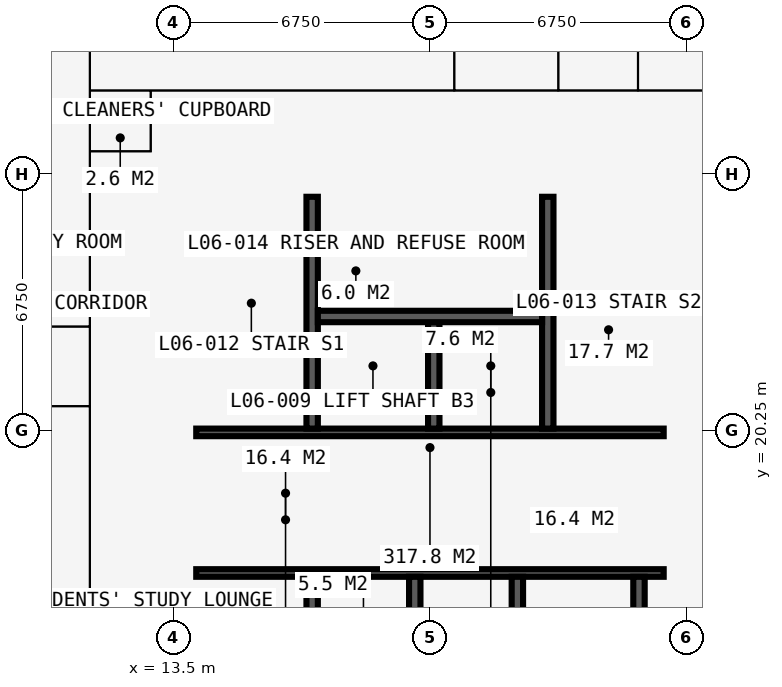
"""IFC4 building model, lengths in metres.
Left out: names, types, materials, properties, quantities, classifications, styles, units other than length and angle.
Written with IfcOpenShell. Run it as: python <this file> out.ifc"""

import sys

from ifc_helpers import new_model, si_unit, direction, frame, frame_2d, origin, place, context, subcontext, project, spatial, rectangle, extrude, element, fill, save


model = new_model("IFC4")
c1 = context("Model", 3, precision=1e-05, world=origin(), true_north=direction((0.0, 1.0)))
c2 = subcontext(c1, "Body", "Model", "MODEL_VIEW")
j1 = project(units=[si_unit("LENGTHUNIT", "METRE"), si_unit("PLANEANGLEUNIT", "RADIAN")], contexts=[c1])
p1 = place(None, origin())
s1 = spatial("IfcSite", under=j1, at=p1, CompositionType="ELEMENT")
p2 = place(p1, origin())
s2 = spatial("IfcBuilding", under=s1, at=p2, CompositionType="ELEMENT")
p3 = place(p2, frame((0.0, 0.0, 25.2)))
s3 = spatial("IfcBuildingStorey", under=s2, at=p3, CompositionType="ELEMENT", Elevation=25.2)
p4 = place(p3, frame((27.0, 14.1, 0.0), z_axis=(0.0, 0.0, 1.0), x_axis=(0.0, 1.0, 0.0)))
e1 = element("IfcWall", 1, at=p4, inside=s3, PredefinedType="SHEAR", context=c2, shape_type="SweptSolid", body=[
    extrude(rectangle(XDim=12.3, YDim=1.2, at=frame_2d((6.15, 0.0))), origin(), (0.0, 0.0, 1.0), 3.6),
])
p5 = place(p4, frame((3.65, 0.0, 0.0)))
e2 = element("IfcOpeningElement", 2, at=p5, cuts=e1, PredefinedType="OPENING", context=c2, shape_type="SweptSolid", body=[
    extrude(rectangle(XDim=1.2, YDim=2.2, at=frame_2d((0.6, 1.1))), frame((0.0, 0.61, 0.0), z_axis=(0.0, -1.0, 0.0), x_axis=(1.0, 0.0, 0.0)), (0.0, 0.0, 1.0), 1.22),
])
p6 = place(p3, frame((27.6, 27.0, 0.0), z_axis=(0.0, 0.0, 1.0), x_axis=(-1.0, 0.0, 0.0)))
e3 = element("IfcWall", 3, at=p6, inside=s3, PredefinedType="SHEAR", context=c2, shape_type="SweptSolid", body=[
    extrude(rectangle(XDim=14.7, YDim=1.2, at=frame_2d((7.35, 0.0))), origin(), (0.0, 0.0, 1.0), 3.6),
])
p7 = place(p6, frame((5.225, 0.0, 0.0)))
e4 = element("IfcOpeningElement", 4, at=p7, cuts=e3, PredefinedType="OPENING", context=c2, shape_type="SweptSolid", body=[
    extrude(rectangle(XDim=0.9, YDim=2.2, at=frame_2d((0.45, 1.1))), frame((0.0, 0.61, 0.0), z_axis=(0.0, -1.0, 0.0), x_axis=(1.0, 0.0, 0.0)), (0.0, 0.0, 1.0), 1.22),
])
p8 = place(p6, frame((8.2, 0.0, 0.0)))
e5 = element("IfcOpeningElement", 5, at=p8, cuts=e3, PredefinedType="OPENING", context=c2, shape_type="SweptSolid", body=[
    extrude(rectangle(XDim=1.0, YDim=2.2, at=frame_2d((0.5, 1.1))), frame((0.0, 0.61, 0.0), z_axis=(0.0, -1.0, 0.0), x_axis=(1.0, 0.0, 0.0)), (0.0, 0.0, 1.0), 1.22),
])
p9 = place(p3, frame((13.5, 26.4, 0.0), z_axis=(0.0, 0.0, 1.0), x_axis=(0.0, -1.0, 0.0)))
e6 = element("IfcWall", 6, at=p9, inside=s3, PredefinedType="SHEAR", context=c2, shape_type="SweptSolid", body=[
    extrude(rectangle(XDim=12.3, YDim=1.2, at=frame_2d((6.15, 0.0))), origin(), (0.0, 0.0, 1.0), 3.6),
])
p10 = place(p9, frame((7.45, 0.0, 0.0)))
e7 = element("IfcOpeningElement", 7, at=p10, cuts=e6, PredefinedType="OPENING", context=c2, shape_type="SweptSolid", body=[
    extrude(rectangle(XDim=1.2, YDim=2.2, at=frame_2d((0.6, 1.1))), frame((0.0, 0.61, 0.0), z_axis=(0.0, -1.0, 0.0), x_axis=(1.0, 0.0, 0.0)), (0.0, 0.0, 1.0), 1.22),
])
p11 = place(p3, frame((14.1, 16.5, 0.0), z_axis=(0.0, 0.0, 1.0), x_axis=(1.0, 0.0, 0.0)))
e8 = element("IfcWall", 8, at=p11, inside=s3, PredefinedType="SHEAR", context=c2, shape_type="SweptSolid", body=[
    extrude(rectangle(XDim=12.3, YDim=0.2, at=frame_2d((6.15, 0.0))), origin(), (0.0, 0.0, 1.0), 3.6),
])
p12 = place(p11, frame((0.9, 0.0, 0.0)))
e9 = element("IfcOpeningElement", 9, at=p12, cuts=e8, PredefinedType="OPENING", context=c2, shape_type="SweptSolid", body=[
    extrude(rectangle(XDim=1.1, YDim=2.2, at=frame_2d((0.55, 1.1))), frame((0.0, 0.11, 0.0), z_axis=(0.0, -1.0, 0.0), x_axis=(1.0, 0.0, 0.0)), (0.0, 0.0, 1.0), 0.22),
])
p13 = place(p11, frame((9.5, 0.0, 0.0)))
e10 = element("IfcOpeningElement", 10, at=p13, cuts=e8, PredefinedType="OPENING", context=c2, shape_type="SweptSolid", body=[
    extrude(rectangle(XDim=1.1, YDim=2.2, at=frame_2d((0.55, 1.1))), frame((0.0, 0.11, 0.0), z_axis=(0.0, -1.0, 0.0), x_axis=(1.0, 0.0, 0.0)), (0.0, 0.0, 1.0), 0.22),
])
p14 = place(p3, frame((14.1, 20.2, 0.0), z_axis=(0.0, 0.0, 1.0), x_axis=(1.0, 0.0, 0.0)))
e11 = element("IfcWall", 11, at=p14, inside=s3, PredefinedType="SHEAR", context=c2, shape_type="SweptSolid", body=[
    extrude(rectangle(XDim=12.3, YDim=0.2, at=frame_2d((6.15, 0.0))), origin(), (0.0, 0.0, 1.0), 3.6),
])
p15 = place(p14, frame((0.35, 0.0, 0.0)))
e12 = element("IfcOpeningElement", 12, at=p15, cuts=e11, PredefinedType="OPENING", context=c2, shape_type="SweptSolid", body=[
    extrude(rectangle(XDim=1.1, YDim=2.2, at=frame_2d((0.55, 1.1))), frame((0.0, 0.11, 0.0), z_axis=(0.0, -1.0, 0.0), x_axis=(1.0, 0.0, 0.0)), (0.0, 0.0, 1.0), 0.22),
])
p16 = place(p14, frame((9.75, 0.0, 0.0)))
e13 = element("IfcOpeningElement", 13, at=p16, cuts=e11, PredefinedType="OPENING", context=c2, shape_type="SweptSolid", body=[
    extrude(rectangle(XDim=1.1, YDim=2.2, at=frame_2d((0.55, 1.1))), frame((0.0, 0.11, 0.0), z_axis=(0.0, -1.0, 0.0), x_axis=(1.0, 0.0, 0.0)), (0.0, 0.0, 1.0), 0.22),
])
for number, where, z_axis, x_axis in (
    (14, (17.15, 20.3, 0.0), (0.0, 0.0, 1.0), (0.0, 1.0, 0.0)),
    (15, (23.35, 20.3, 0.0), (0.0, 0.0, 1.0), (0.0, 1.0, 0.0)),
):
    element("IfcWall", number, at=place(p3, frame(where, z_axis=z_axis, x_axis=x_axis)), inside=s3, PredefinedType="SHEAR", context=c2, shape_type="SweptSolid", body=[
        extrude(rectangle(XDim=6.1, YDim=0.3, at=frame_2d((3.05, 0.0))), origin(), (0.0, 0.0, 1.0), 3.6),
    ])
p17 = place(p3, frame((20.35, 20.3, 0.0), z_axis=(0.0, 0.0, 1.0), x_axis=(0.0, 1.0, 0.0)))
e16 = element("IfcWall", 16, at=p17, inside=s3, PredefinedType="SHEAR", context=c2, shape_type="SweptSolid", body=[
    extrude(rectangle(XDim=2.8, YDim=0.3, at=frame_2d((1.4, 0.0))), origin(), (0.0, 0.0, 1.0), 3.6),
])
p18 = place(p3, frame((17.3, 23.25, 0.0), z_axis=(0.0, 0.0, 1.0), x_axis=(1.0, 0.0, 0.0)))
e17 = element("IfcWall", 17, at=p18, inside=s3, PredefinedType="SHEAR", context=c2, shape_type="SweptSolid", body=[
    extrude(rectangle(XDim=5.9, YDim=0.3, at=frame_2d((2.95, 0.0))), origin(), (0.0, 0.0, 1.0), 3.6),
])
for number, where, z_axis, x_axis in (
    (18, (17.15, 14.1, 0.0), (0.0, 0.0, 1.0), (0.0, 1.0, 0.0)),
    (19, (19.85, 14.1, 0.0), (0.0, 0.0, 1.0), (0.0, 1.0, 0.0)),
    (20, (22.55, 14.1, 0.0), (0.0, 0.0, 1.0), (0.0, 1.0, 0.0)),
    (21, (25.75, 14.1, 0.0), (0.0, 0.0, 1.0), (0.0, 1.0, 0.0)),
):
    element("IfcWall", number, at=place(p3, frame(where, z_axis=z_axis, x_axis=x_axis)), inside=s3, PredefinedType="SHEAR", context=c2, shape_type="SweptSolid", body=[
        extrude(rectangle(XDim=2.3, YDim=0.3, at=frame_2d((1.15, 0.0))), origin(), (0.0, 0.0, 1.0), 3.6),
    ])
p19 = place(p3, frame((18.875, 16.6, 0.0), z_axis=(0.0, 0.0, 1.0), x_axis=(0.0, 1.0, 0.0)))
e22 = element("IfcWall", 22, at=p19, inside=s3, PredefinedType="PARTITIONING", context=c2, shape_type="SweptSolid", body=[
    extrude(rectangle(XDim=3.5, YDim=0.15, at=frame_2d((1.75, 0.0))), origin(), (0.0, 0.0, 1.0), 3.375),
])
p20 = place(p19, frame((1.15, 0.0, 0.0)))
e23 = element("IfcOpeningElement", 23, at=p20, cuts=e22, PredefinedType="OPENING", context=c2, shape_type="SweptSolid", body=[
    extrude(rectangle(XDim=1.2, YDim=2.2, at=frame_2d((0.6, 1.1))), frame((0.0, 0.085, 0.0), z_axis=(0.0, -1.0, 0.0), x_axis=(1.0, 0.0, 0.0)), (0.0, 0.0, 1.0), 0.17),
])
p21 = place(p3, frame((21.625, 16.6, 0.0), z_axis=(0.0, 0.0, 1.0), x_axis=(0.0, 1.0, 0.0)))
e24 = element("IfcWall", 24, at=p21, inside=s3, PredefinedType="PARTITIONING", context=c2, shape_type="SweptSolid", body=[
    extrude(rectangle(XDim=3.5, YDim=0.15, at=frame_2d((1.75, 0.0))), origin(), (0.0, 0.0, 1.0), 3.375),
])
p22 = place(p21, frame((1.15, 0.0, 0.0)))
e25 = element("IfcOpeningElement", 25, at=p22, cuts=e24, PredefinedType="OPENING", context=c2, shape_type="SweptSolid", body=[
    extrude(rectangle(XDim=1.2, YDim=2.2, at=frame_2d((0.6, 1.1))), frame((0.0, 0.085, 0.0), z_axis=(0.0, -1.0, 0.0), x_axis=(1.0, 0.0, 0.0)), (0.0, 0.0, 1.0), 0.17),
])
p23 = place(p3, frame((20.38, 16.6, 0.0), z_axis=(0.0, 0.0, 1.0), x_axis=(0.0, 1.0, 0.0)))
e26 = element("IfcWall", 26, at=p23, inside=s3, PredefinedType="PARTITIONING", context=c2, shape_type="SweptSolid", body=[
    extrude(rectangle(XDim=3.5, YDim=0.15, at=frame_2d((1.75, 0.0))), origin(), (0.0, 0.0, 1.0), 3.375),
])
p24 = place(p3, frame((19.375, 23.4, 0.0), z_axis=(0.0, 0.0, 1.0), x_axis=(0.0, 1.0, 0.0)))
e27 = element("IfcWall", 27, at=p24, inside=s3, PredefinedType="PARTITIONING", context=c2, shape_type="SweptSolid", body=[
    extrude(rectangle(XDim=3.0, YDim=0.15, at=frame_2d((1.5, 0.0))), origin(), (0.0, 0.0, 1.0), 3.375),
])
for number, where, z_axis, x_axis in (
    (28, (5.65, 20.887, 0.0), (0.0, 0.0, 1.0), (1.0, 0.0, 0.0)),
    (29, (5.65, 22.988, 0.0), (0.0, 0.0, 1.0), (1.0, 0.0, 0.0)),
):
    element("IfcWall", number, at=place(p3, frame(where, z_axis=z_axis, x_axis=x_axis)), inside=s3, PredefinedType="PARTITIONING", context=c2, shape_type="SweptSolid", body=[
        extrude(rectangle(XDim=5.65, YDim=0.15, at=frame_2d((2.825, 0.0))), origin(), (0.0, 0.0, 1.0), 3.375),
    ])
p25 = place(p3, frame((11.3, 11.3, 0.0), z_axis=(0.0, 0.0, 1.0), x_axis=(0.0, 1.0, 0.0)))
e30 = element("IfcWall", 30, at=p25, inside=s3, PredefinedType="PARTITIONING", context=c2, shape_type="SweptSolid", body=[
    extrude(rectangle(XDim=19.075, YDim=0.15, at=frame_2d((9.538, 0.0))), origin(), (0.0, 0.0, 1.0), 3.375),
])
p26 = place(p25, frame((10.137, 0.0, 0.0)))
e31 = element("IfcOpeningElement", 31, at=p26, cuts=e30, PredefinedType="OPENING", context=c2, shape_type="SweptSolid", body=[
    extrude(rectangle(XDim=1.0, YDim=2.2, at=frame_2d((0.5, 1.1))), frame((0.0, 0.085, 0.0), z_axis=(0.0, -1.0, 0.0), x_axis=(1.0, 0.0, 0.0)), (0.0, 0.0, 1.0), 0.17),
])
p27 = place(p3, frame((11.3, 27.6, 0.0), z_axis=(0.0, 0.0, 1.0), x_axis=(1.0, 0.0, 0.0)))
e32 = element("IfcWall", 32, at=p27, inside=s3, PredefinedType="PARTITIONING", context=c2, shape_type="SweptSolid", body=[
    extrude(rectangle(XDim=1.6, YDim=0.15, at=frame_2d((0.8, 0.0))), origin(), (0.0, 0.0, 1.0), 2.877),
])
p28 = place(p27, frame((0.3, 0.0, 0.0)))
e33 = element("IfcOpeningElement", 33, at=p28, cuts=e32, PredefinedType="OPENING", context=c2, shape_type="SweptSolid", body=[
    extrude(rectangle(XDim=0.95, YDim=2.2, at=frame_2d((0.475, 1.1))), frame((0.0, 0.085, 0.0), z_axis=(0.0, -1.0, 0.0), x_axis=(1.0, 0.0, 0.0)), (0.0, 0.0, 1.0), 0.17),
])
p29 = place(p3, frame((11.3, 29.2, 0.0), z_axis=(0.0, 0.0, 1.0), x_axis=(1.0, 0.0, 0.0)))
e34 = element("IfcWall", 34, at=p29, inside=s3, PredefinedType="PARTITIONING", context=c2, shape_type="SweptSolid", body=[
    extrude(rectangle(XDim=19.075, YDim=0.15, at=frame_2d((9.538, 0.0))), origin(), (0.0, 0.0, 1.0), 3.375),
])
p30 = place(p29, frame((12.875, 0.0, 0.0)))
e35 = element("IfcOpeningElement", 35, at=p30, cuts=e34, PredefinedType="OPENING", context=c2, shape_type="SweptSolid", body=[
    extrude(rectangle(XDim=1.0, YDim=2.2, at=frame_2d((0.5, 1.1))), frame((0.0, 0.085, 0.0), z_axis=(0.0, -1.0, 0.0), x_axis=(1.0, 0.0, 0.0)), (0.0, 0.0, 1.0), 0.17),
])
p31 = place(p29, frame((10.438, 0.0, 0.0)))
e36 = element("IfcOpeningElement", 36, at=p31, cuts=e34, PredefinedType="OPENING", context=c2, shape_type="SweptSolid", body=[
    extrude(rectangle(XDim=1.0, YDim=2.2, at=frame_2d((0.5, 1.1))), frame((0.0, 0.085, 0.0), z_axis=(0.0, -1.0, 0.0), x_axis=(1.0, 0.0, 0.0)), (0.0, 0.0, 1.0), 0.17),
])
p32 = place(p29, frame((15.675, 0.0, 0.0)))
e37 = element("IfcOpeningElement", 37, at=p32, cuts=e34, PredefinedType="OPENING", context=c2, shape_type="SweptSolid", body=[
    extrude(rectangle(XDim=0.95, YDim=2.2, at=frame_2d((0.475, 1.1))), frame((0.0, 0.085, 0.0), z_axis=(0.0, -1.0, 0.0), x_axis=(1.0, 0.0, 0.0)), (0.0, 0.0, 1.0), 0.17),
])
p33 = place(p3, frame((12.9, 27.6, 0.0), z_axis=(0.0, 0.0, 1.0), x_axis=(0.0, 1.0, 0.0)))
e38 = element("IfcWall", 38, at=p33, inside=s3, PredefinedType="PARTITIONING", context=c2, shape_type="SweptSolid", body=[
    extrude(rectangle(XDim=1.6, YDim=0.15, at=frame_2d((0.8, 0.0))), origin(), (0.0, 0.0, 1.0), 3.375),
])
p34 = place(p3, frame((20.887, 29.2, 0.0), z_axis=(0.0, 0.0, 1.0), x_axis=(0.0, 1.0, 0.0)))
e39 = element("IfcWall", 39, at=p34, inside=s3, PredefinedType="PARTITIONING", context=c2, shape_type="SweptSolid", body=[
    extrude(rectangle(XDim=5.65, YDim=0.15, at=frame_2d((2.825, 0.0))), origin(), (0.0, 0.0, 1.0), 3.375),
])
p35 = place(p3, frame((23.625, 29.2, 0.0), z_axis=(0.0, 0.0, 1.0), x_axis=(0.0, 1.0, 0.0)))
e40 = element("IfcWall", 40, at=p35, inside=s3, PredefinedType="PARTITIONING", context=c2, shape_type="SweptSolid", body=[
    extrude(rectangle(XDim=12.034, YDim=0.15, at=frame_2d((6.017, 0.0))), origin(), (0.0, 0.0, 1.0), 3.375),
])
p36 = place(p3, frame((25.725, 29.2, 0.0), z_axis=(0.0, 0.0, 1.0), x_axis=(0.0, 1.0, 0.0)))
e41 = element("IfcWall", 41, at=p36, inside=s3, PredefinedType="PARTITIONING", context=c2, shape_type="SweptSolid", body=[
    extrude(rectangle(XDim=5.65, YDim=0.15, at=frame_2d((2.825, 0.0))), origin(), (0.0, 0.0, 1.0), 3.375),
])
p37 = place(p12, origin())
e42 = element("IfcDoor", 42, at=p37, inside=s3, OperationType="DOUBLE_DOOR_SLIDING", PredefinedType="DOOR", context=c2, shape_type="SweptSolid", body=[
    extrude(rectangle(XDim=1.1, YDim=2.2, at=frame_2d((0.55, 1.1))), frame((0.0, 0.025, 0.0), z_axis=(0.0, -1.0, 0.0), x_axis=(1.0, 0.0, 0.0)), (0.0, 0.0, 1.0), 0.05),
])
fill(e9, e42)
p38 = place(p13, origin())
e43 = element("IfcDoor", 43, at=p38, inside=s3, OperationType="DOUBLE_DOOR_SLIDING", PredefinedType="DOOR", context=c2, shape_type="SweptSolid", body=[
    extrude(rectangle(XDim=1.1, YDim=2.2, at=frame_2d((0.55, 1.1))), frame((0.0, 0.025, 0.0), z_axis=(0.0, -1.0, 0.0), x_axis=(1.0, 0.0, 0.0)), (0.0, 0.0, 1.0), 0.05),
])
fill(e10, e43)
p39 = place(p10, origin())
e44 = element("IfcDoor", 44, at=p39, inside=s3, OperationType="DOUBLE_DOOR_SINGLE_SWING", PredefinedType="DOOR", context=c2, shape_type="SweptSolid", body=[
    extrude(rectangle(XDim=1.2, YDim=2.2, at=frame_2d((0.6, 1.1))), frame((0.0, 0.025, 0.0), z_axis=(0.0, -1.0, 0.0), x_axis=(1.0, 0.0, 0.0)), (0.0, 0.0, 1.0), 0.05),
])
fill(e7, e44)
p40 = place(p5, origin())
e45 = element("IfcDoor", 45, at=p40, inside=s3, OperationType="DOUBLE_DOOR_SINGLE_SWING", PredefinedType="DOOR", context=c2, shape_type="SweptSolid", body=[
    extrude(rectangle(XDim=1.2, YDim=2.2, at=frame_2d((0.6, 1.1))), frame((0.0, 0.025, 0.0), z_axis=(0.0, -1.0, 0.0), x_axis=(1.0, 0.0, 0.0)), (0.0, 0.0, 1.0), 0.05),
])
fill(e2, e45)
p41 = place(p20, origin())
e46 = element("IfcDoor", 46, at=p41, inside=s3, OperationType="DOUBLE_DOOR_SINGLE_SWING", PredefinedType="DOOR", context=c2, shape_type="SweptSolid", body=[
    extrude(rectangle(XDim=1.2, YDim=2.2, at=frame_2d((0.6, 1.1))), frame((0.0, 0.025, 0.0), z_axis=(0.0, -1.0, 0.0), x_axis=(1.0, 0.0, 0.0)), (0.0, 0.0, 1.0), 0.05),
])
fill(e23, e46)
p42 = place(p22, origin())
e47 = element("IfcDoor", 47, at=p42, inside=s3, OperationType="DOUBLE_DOOR_SINGLE_SWING", PredefinedType="DOOR", context=c2, shape_type="SweptSolid", body=[
    extrude(rectangle(XDim=1.2, YDim=2.2, at=frame_2d((0.6, 1.1))), frame((0.0, 0.025, 0.0), z_axis=(0.0, -1.0, 0.0), x_axis=(1.0, 0.0, 0.0)), (0.0, 0.0, 1.0), 0.05),
])
fill(e25, e47)
p43 = place(p7, origin())
e48 = element("IfcDoor", 48, at=p43, inside=s3, OperationType="SINGLE_SWING_LEFT", PredefinedType="DOOR", context=c2, shape_type="SweptSolid", body=[
    extrude(rectangle(XDim=0.9, YDim=2.2, at=frame_2d((0.45, 1.1))), frame((0.0, 0.4, 0.0), z_axis=(0.0, -1.0, 0.0), x_axis=(1.0, 0.0, 0.0)), (0.0, 0.0, 1.0), 0.8),
])
fill(e4, e48)
p44 = place(p8, origin())
e49 = element("IfcDoor", 49, at=p44, inside=s3, OperationType="SINGLE_SWING_LEFT", PredefinedType="DOOR", context=c2, shape_type="SweptSolid", body=[
    extrude(rectangle(XDim=1.0, YDim=2.2, at=frame_2d((0.5, 1.1))), frame((0.0, 0.025, 0.0), z_axis=(0.0, -1.0, 0.0), x_axis=(1.0, 0.0, 0.0)), (0.0, 0.0, 1.0), 0.05),
])
fill(e5, e49)
p45 = place(p15, origin())
e50 = element("IfcDoor", 50, at=p45, inside=s3, OperationType="SINGLE_SWING_LEFT", PredefinedType="DOOR", context=c2, shape_type="SweptSolid", body=[
    extrude(rectangle(XDim=1.1, YDim=2.2, at=frame_2d((0.55, 1.1))), frame((0.0, 0.025, 0.0), z_axis=(0.0, -1.0, 0.0), x_axis=(1.0, 0.0, 0.0)), (0.0, 0.0, 1.0), 0.05),
])
fill(e12, e50)
p46 = place(p16, origin())
e51 = element("IfcDoor", 51, at=p46, inside=s3, OperationType="SINGLE_SWING_LEFT", PredefinedType="DOOR", context=c2, shape_type="SweptSolid", body=[
    extrude(rectangle(XDim=1.1, YDim=2.2, at=frame_2d((0.55, 1.1))), frame((0.0, 0.025, 0.0), z_axis=(0.0, -1.0, 0.0), x_axis=(1.0, 0.0, 0.0)), (0.0, 0.0, 1.0), 0.05),
])
fill(e13, e51)
p47 = place(p28, origin())
e52 = element("IfcDoor", 52, at=p47, inside=s3, OperationType="SINGLE_SWING_LEFT", PredefinedType="DOOR", context=c2, shape_type="SweptSolid", body=[
    extrude(rectangle(XDim=0.95, YDim=2.2, at=frame_2d((0.475, 1.1))), frame((0.0, 0.025, 0.0), z_axis=(0.0, -1.0, 0.0), x_axis=(1.0, 0.0, 0.0)), (0.0, 0.0, 1.0), 0.05),
])
fill(e33, e52)
p48 = place(p30, origin())
e53 = element("IfcDoor", 53, at=p48, inside=s3, OperationType="SINGLE_SWING_LEFT", PredefinedType="DOOR", context=c2, shape_type="SweptSolid", body=[
    extrude(rectangle(XDim=1.0, YDim=2.2, at=frame_2d((0.5, 1.1))), frame((0.0, 0.025, 0.0), z_axis=(0.0, -1.0, 0.0), x_axis=(1.0, 0.0, 0.0)), (0.0, 0.0, 1.0), 0.05),
])
fill(e35, e53)
p49 = place(p31, origin())
e54 = element("IfcDoor", 54, at=p49, inside=s3, OperationType="SINGLE_SWING_LEFT", PredefinedType="DOOR", context=c2, shape_type="SweptSolid", body=[
    extrude(rectangle(XDim=1.0, YDim=2.2, at=frame_2d((0.5, 1.1))), frame((0.0, 0.025, 0.0), z_axis=(0.0, -1.0, 0.0), x_axis=(1.0, 0.0, 0.0)), (0.0, 0.0, 1.0), 0.05),
])
fill(e36, e54)
p50 = place(p32, origin())
e55 = element("IfcDoor", 55, at=p50, inside=s3, OperationType="SINGLE_SWING_LEFT", PredefinedType="DOOR", context=c2, shape_type="SweptSolid", body=[
    extrude(rectangle(XDim=0.95, YDim=2.2, at=frame_2d((0.475, 1.1))), frame((0.0, 0.025, 0.0), z_axis=(0.0, -1.0, 0.0), x_axis=(1.0, 0.0, 0.0)), (0.0, 0.0, 1.0), 0.05),
])
fill(e37, e55)
p51 = place(p26, origin())
e56 = element("IfcDoor", 56, at=p51, inside=s3, OperationType="SINGLE_SWING_LEFT", PredefinedType="DOOR", context=c2, shape_type="SweptSolid", body=[
    extrude(rectangle(XDim=1.0, YDim=2.2, at=frame_2d((0.5, 1.1))), frame((0.0, 0.025, 0.0), z_axis=(0.0, -1.0, 0.0), x_axis=(1.0, 0.0, 0.0)), (0.0, 0.0, 1.0), 0.05),
])
fill(e31, e56)
save(model, sys.argv[1])
